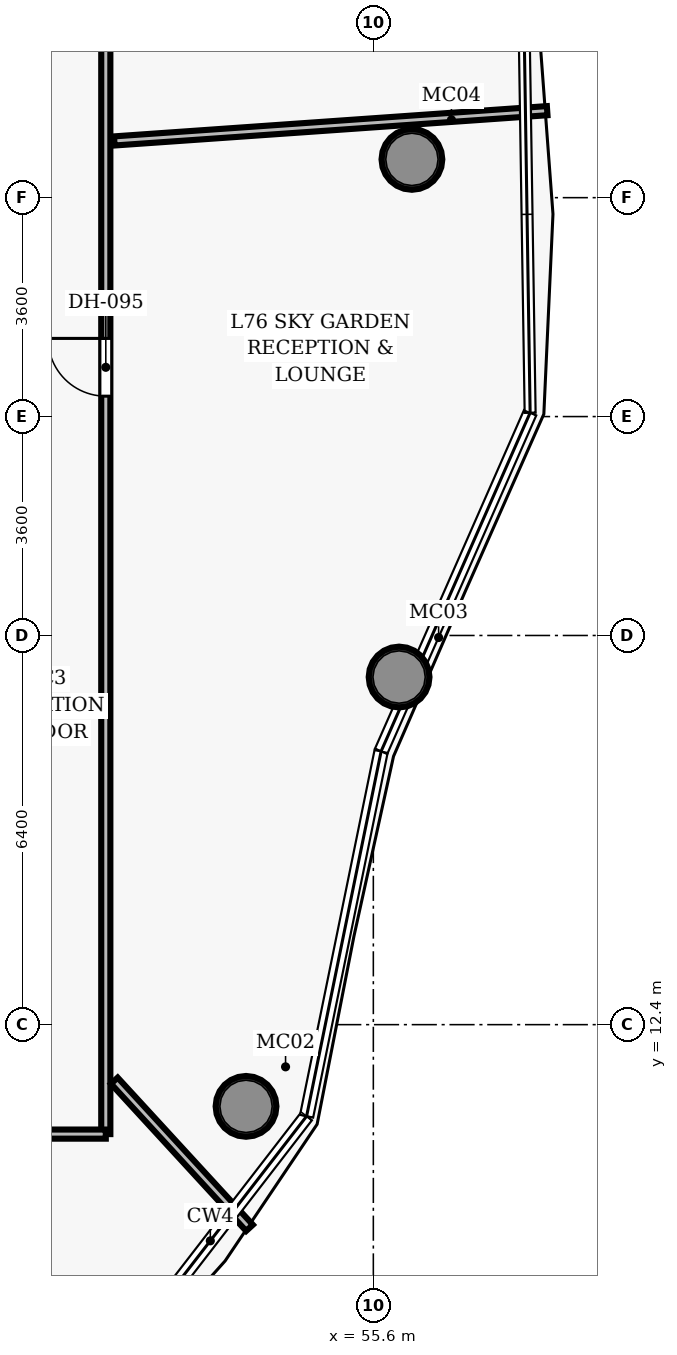
"""IFC4 building model, lengths in metres.
Left out: names, types, materials, properties, quantities, classifications, styles, units other than length and angle.
Written with IfcOpenShell. Run it as: python <this file> out.ifc"""

import sys

from ifc_helpers import new_model, si_unit, direction, frame, frame_2d, origin, origin_2d, place, context, subcontext, project, spatial, rectangle, hollow_circle, extrude, element, fill, save


model = new_model("IFC4")
c1 = context("Model", 3, precision=1e-05, world=origin(), true_north=direction((0.0, 1.0)))
c2 = subcontext(c1, "Body", "Model", "MODEL_VIEW")
j1 = project(units=[si_unit("LENGTHUNIT", "METRE"), si_unit("PLANEANGLEUNIT", "RADIAN")], contexts=[c1])
p1 = place(None, origin())
s1 = spatial("IfcSite", under=j1, at=p1, CompositionType="ELEMENT")
p2 = place(p1, origin())
s2 = spatial("IfcBuilding", under=s1, at=p2, CompositionType="ELEMENT")
p3 = place(p2, frame((0.0, 0.0, 299.8)))
s3 = spatial("IfcBuildingStorey", under=s2, at=p3, CompositionType="ELEMENT", Elevation=299.8)
for number, where, z_axis, x_axis in (
    (1, (53.506, 11.056, 0.0), (0.0, 0.0, 1.0), (1.0, 0.0, 0.0)),
    (2, (56.024, 18.116, 0.0), (0.0, 0.0, 1.0), (1.0, 0.0, 0.0)),
    (3, (56.235, 26.629, 0.0), (0.0, 0.0, 1.0), (1.0, 0.0, 0.0)),
):
    element("IfcColumn", number, at=place(p3, frame(where, z_axis=z_axis, x_axis=x_axis)), inside=s3, PredefinedType="COLUMN", context=c2, shape_type="SweptSolid", body=[
        extrude(hollow_circle(Radius=0.5, WallThickness=0.045, at=origin_2d()), origin(), (0.0, 0.0, 1.0), 3.85),
    ])
p4 = place(p3, frame((51.2, 10.6, 0.0), z_axis=(0.0, 0.0, 1.0), x_axis=(0.0, 1.0, 0.0)))
e4 = element("IfcWall", 4, at=p4, inside=s3, PredefinedType="PARTITIONING", context=c2, shape_type="SweptSolid", body=[
    extrude(rectangle(XDim=30.8, YDim=0.15, at=frame_2d((15.4, 0.0))), origin(), (0.0, 0.0, 1.0), 3.04),
])
p5 = place(p4, frame((18.976, 0.0, 0.0)))
e5 = element("IfcOpeningElement", 5, at=p5, cuts=e4, PredefinedType="OPENING", context=c2, shape_type="SweptSolid", body=[
    extrude(rectangle(XDim=1.5, YDim=2.2, at=frame_2d((0.75, 1.1))), frame((0.0, 0.085, 0.0), z_axis=(0.0, -1.0, 0.0), x_axis=(1.0, 0.0, 0.0)), (0.0, 0.0, 1.0), 0.17),
])
p6 = place(p4, frame((12.135, 0.0, 0.0)))
e6 = element("IfcOpeningElement", 6, at=p6, cuts=e4, PredefinedType="OPENING", context=c2, shape_type="SweptSolid", body=[
    extrude(rectangle(XDim=0.95, YDim=2.15, at=frame_2d((0.475, 1.075))), frame((0.0, 0.085, 0.0), z_axis=(0.0, -1.0, 0.0), x_axis=(1.0, 0.0, 0.0)), (0.0, 0.0, 1.0), 0.17),
])
p7 = place(p3, frame((49.1, 10.6, 0.0), z_axis=(0.0, 0.0, 1.0), x_axis=(1.0, 0.0, 0.0)))
e7 = element("IfcWall", 7, at=p7, inside=s3, PredefinedType="PARTITIONING", context=c2, shape_type="SweptSolid", body=[
    extrude(rectangle(XDim=2.1, YDim=0.15, at=frame_2d((1.05, 0.0))), origin(), (0.0, 0.0, 1.0), 3.04),
])
p8 = place(p3, frame((51.34, 26.933, 0.0), z_axis=(0.0, 0.0, 1.0), x_axis=(0.997564040522, 0.069756613005, 0.0)))
e8 = element("IfcWall", 8, at=p8, inside=s3, PredefinedType="PARTITIONING", context=c2, shape_type="SweptSolid", body=[
    extrude(rectangle(XDim=7.136, YDim=0.15, at=frame_2d((3.568, 0.0))), origin(), (0.0, 0.0, 1.0), 3.04),
])
p9 = place(p3, frame((51.34, 11.478, 0.0), z_axis=(0.0, 0.0, 1.0), x_axis=(0.676538208378, -0.736407531605, 0.0)))
e9 = element("IfcWall", 9, at=p9, inside=s3, PredefinedType="PARTITIONING", context=c2, shape_type="SweptSolid", body=[
    extrude(rectangle(XDim=3.287, YDim=0.15, at=frame_2d((1.644, 0.0))), origin(), (0.0, 0.0, 1.0), 3.04),
])
p10 = place(p6, origin())
e10 = element("IfcDoor", 10, at=p10, inside=s3, OperationType="SINGLE_SWING_RIGHT", PredefinedType="DOOR", context=c2, shape_type="SweptSolid", body=[
    extrude(rectangle(XDim=0.95, YDim=2.15, at=frame_2d((0.475, 1.075))), frame((0.0, 0.025, 0.0), z_axis=(0.0, -1.0, 0.0), x_axis=(1.0, 0.0, 0.0)), (0.0, 0.0, 1.0), 0.05),
])
fill(e6, e10)
save(model, sys.argv[1])
